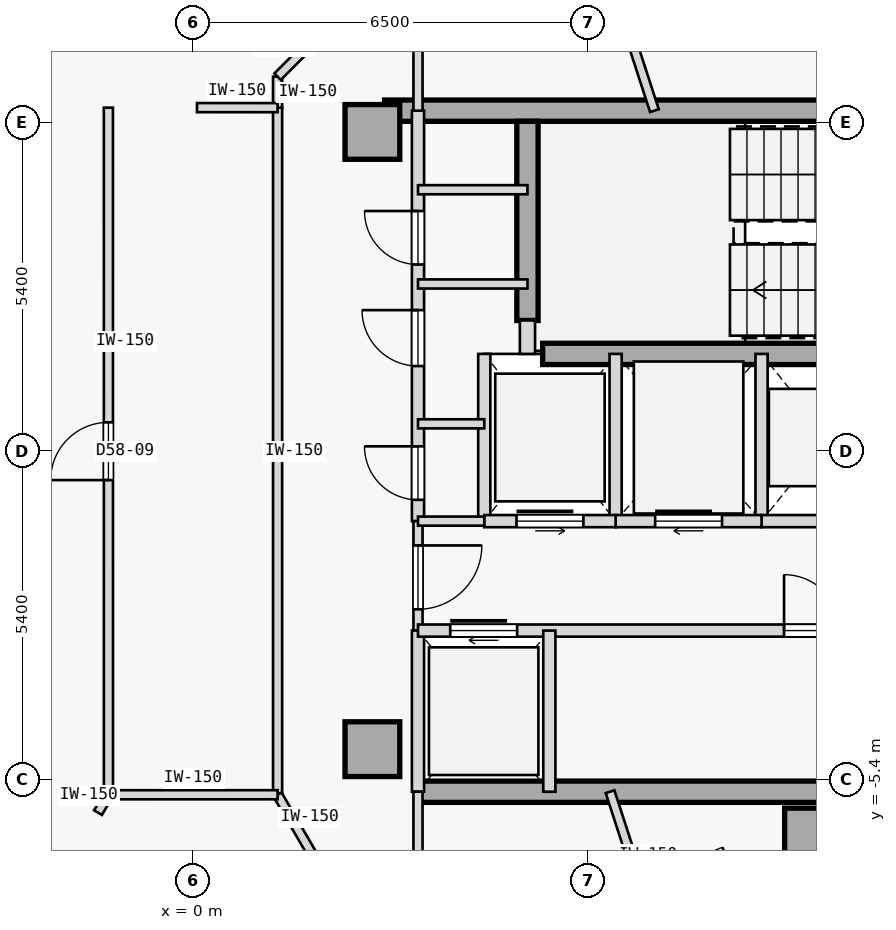
"""IFC4 building model, lengths in metres.
Left out: names, types, materials, properties, quantities, classifications, styles, units other than length and angle.
Written with IfcOpenShell. Run it as: python <this file> out.ifc"""

import sys

from ifc_helpers import new_model, si_unit, direction, frame, frame_2d, origin, origin_2d, place, context, subcontext, project, spatial, rectangle, extrude, element, fill, save


model = new_model("IFC4")
c1 = context("Model", 3, precision=1e-05, world=origin(), true_north=direction((0.0, 1.0)))
c2 = subcontext(c1, "Body", "Model", "MODEL_VIEW")
j1 = project(units=[si_unit("LENGTHUNIT", "METRE"), si_unit("PLANEANGLEUNIT", "RADIAN")], contexts=[c1])
p1 = place(None, origin())
s1 = spatial("IfcSite", under=j1, at=p1, CompositionType="ELEMENT")
p2 = place(p1, origin())
s2 = spatial("IfcBuilding", under=s1, at=p2, CompositionType="ELEMENT")
p3 = place(p2, frame((0.0, 0.0, 220.95)))
s3 = spatial("IfcBuildingStorey", under=s2, at=p3, CompositionType="ELEMENT", Elevation=220.95)
for number, where, z_axis, x_axis in (
    (1, (10.18, -6.32, 0.0), (0.0, 0.0, 1.0), (1.0, 0.0, 0.0)),
    (2, (2.95, -4.9, 0.0), (0.0, 0.0, 1.0), (1.0, 0.0, 0.0)),
    (3, (2.95, 5.25, 0.0), (0.0, 0.0, 1.0), (1.0, 0.0, 0.0)),
):
    element("IfcColumn", number, at=place(p3, frame(where, z_axis=z_axis, x_axis=x_axis)), inside=s3, PredefinedType="COLUMN", context=c2, shape_type="SweptSolid", body=[
        extrude(rectangle(XDim=0.9, YDim=0.9, at=origin_2d()), origin(), (0.0, 0.0, 1.0), 3.35),
    ])
p4 = place(p3, frame((3.15, 5.6, 0.0), z_axis=(0.0, 0.0, 1.0), x_axis=(1.0, 0.0, 0.0)))
e4 = element("IfcWall", 4, at=p4, inside=s3, PredefinedType="SHEAR", context=c2, shape_type="SweptSolid", body=[
    extrude(rectangle(XDim=11.41, YDim=0.35, at=frame_2d((5.705, 0.0))), origin(), (0.0, 0.0, 1.0), 3.125),
])
p5 = place(p3, frame((3.7, -5.6, 0.0), z_axis=(0.0, 0.0, 1.0), x_axis=(1.0, 0.0, 0.0)))
e5 = element("IfcWall", 5, at=p5, inside=s3, PredefinedType="SHEAR", context=c2, shape_type="SweptSolid", body=[
    extrude(rectangle(XDim=10.86, YDim=0.35, at=frame_2d((5.43, 0.0))), origin(), (0.0, 0.0, 1.0), 3.125),
])
p6 = place(p3, frame((5.5, 2.15, 0.0), z_axis=(0.0, 0.0, 1.0), x_axis=(0.0, 1.0, 0.0)))
e6 = element("IfcWall", 6, at=p6, inside=s3, PredefinedType="SHEAR", context=c2, shape_type="SweptSolid", body=[
    extrude(rectangle(XDim=3.275, YDim=0.35, at=frame_2d((1.638, 0.0))), origin(), (0.0, 0.0, 1.0), 3.125),
])
p7 = place(p3, frame((5.75, 1.6, 0.0), z_axis=(0.0, 0.0, 1.0), x_axis=(1.0, 0.0, 0.0)))
e7 = element("IfcWall", 7, at=p7, inside=s3, PredefinedType="SHEAR", context=c2, shape_type="SweptSolid", body=[
    extrude(rectangle(XDim=5.15, YDim=0.35, at=frame_2d((2.575, 0.0))), origin(), (0.0, 0.0, 1.0), 3.125),
])
p8 = place(p3, frame((5.5, 1.6, 0.0), z_axis=(0.0, 0.0, 1.0), x_axis=(0.0, 1.0, 0.0)))
e8 = element("IfcWall", 8, at=p8, inside=s3, PredefinedType="STANDARD", context=c2, shape_type="SweptSolid", body=[
    extrude(rectangle(XDim=0.55, YDim=0.25, at=frame_2d((0.275, 0.0))), origin(), (0.0, 0.0, 1.0), 3.125),
])
p9 = place(p3, frame((3.7, -1.15, 0.0), z_axis=(0.0, 0.0, 1.0), x_axis=(0.0, 1.0, 0.0)))
e9 = element("IfcWall", 9, at=p9, inside=s3, PredefinedType="STANDARD", context=c2, shape_type="SweptSolid", body=[
    extrude(rectangle(XDim=6.75, YDim=0.2, at=frame_2d((3.375, 0.0))), origin(), (0.0, 0.0, 1.0), 3.125),
])
p10 = place(p9, frame((0.35, 0.0, 0.0)))
e10 = element("IfcOpeningElement", 10, at=p10, cuts=e9, PredefinedType="OPENING", context=c2, shape_type="SweptSolid", body=[
    extrude(rectangle(XDim=0.88, YDim=2.15, at=frame_2d((0.44, 1.075))), frame((0.0, 0.11, 0.0), z_axis=(0.0, -1.0, 0.0), x_axis=(1.0, 0.0, 0.0)), (0.0, 0.0, 1.0), 0.22),
])
p11 = place(p9, frame((2.55, 0.0, 0.0)))
e11 = element("IfcOpeningElement", 11, at=p11, cuts=e9, PredefinedType="OPENING", context=c2, shape_type="SweptSolid", body=[
    extrude(rectangle(XDim=0.92, YDim=2.15, at=frame_2d((0.46, 1.075))), frame((0.0, 0.11, 0.0), z_axis=(0.0, -1.0, 0.0), x_axis=(1.0, 0.0, 0.0)), (0.0, 0.0, 1.0), 0.22),
])
p12 = place(p9, frame((4.22, 0.0, 0.0)))
e12 = element("IfcOpeningElement", 12, at=p12, cuts=e9, PredefinedType="OPENING", context=c2, shape_type="SweptSolid", body=[
    extrude(rectangle(XDim=0.88, YDim=2.15, at=frame_2d((0.44, 1.075))), frame((0.0, 0.11, 0.0), z_axis=(0.0, -1.0, 0.0), x_axis=(1.0, 0.0, 0.0)), (0.0, 0.0, 1.0), 0.22),
])
p13 = place(p3, frame((3.7, -2.95, 0.0), z_axis=(0.0, 0.0, 1.0), x_axis=(0.0, 1.0, 0.0)))
e13 = element("IfcWall", 13, at=p13, inside=s3, PredefinedType="PARTITIONING", context=c2, shape_type="SweptSolid", body=[
    extrude(rectangle(XDim=1.8, YDim=0.15, at=frame_2d((0.9, 0.0))), origin(), (0.0, 0.0, 1.0), 3.125),
])
p14 = place(p13, frame((0.35, 0.0, 0.0)))
e14 = element("IfcOpeningElement", 14, at=p14, cuts=e13, PredefinedType="OPENING", context=c2, shape_type="SweptSolid", body=[
    extrude(rectangle(XDim=1.05, YDim=2.18, at=frame_2d((0.525, 1.09))), frame((0.0, 0.085, 0.0), z_axis=(0.0, -1.0, 0.0), x_axis=(1.0, 0.0, 0.0)), (0.0, 0.0, 1.0), 0.17),
])
p15 = place(p3, frame((3.7, -5.6, 0.0), z_axis=(0.0, 0.0, 1.0), x_axis=(0.0, 1.0, 0.0)))
e15 = element("IfcWall", 15, at=p15, inside=s3, PredefinedType="STANDARD", context=c2, shape_type="SweptSolid", body=[
    extrude(rectangle(XDim=2.65, YDim=0.2, at=frame_2d((1.325, 0.0))), origin(), (0.0, 0.0, 1.0), 3.125),
])
p16 = place(p3, frame((9.35, -1.15, 0.0), z_axis=(0.0, 0.0, 1.0), x_axis=(0.0, 1.0, 0.0)))
e16 = element("IfcWall", 16, at=p16, inside=s3, PredefinedType="STANDARD", context=c2, shape_type="SweptSolid", body=[
    extrude(rectangle(XDim=2.75, YDim=0.2, at=frame_2d((1.375, 0.0))), origin(), (0.0, 0.0, 1.0), 3.125),
])
p17 = place(p3, frame((9.35, -1.15, 0.0), z_axis=(0.0, 0.0, 1.0), x_axis=(1.0, 0.0, 0.0)))
e17 = element("IfcWall", 17, at=p17, inside=s3, PredefinedType="STANDARD", context=c2, shape_type="SweptSolid", body=[
    extrude(rectangle(XDim=2.2, YDim=0.2, at=frame_2d((1.1, 0.0))), origin(), (0.0, 0.0, 1.0), 3.125),
])
p18 = place(p3, frame((6.95, -1.15, 0.0), z_axis=(0.0, 0.0, 1.0), x_axis=(0.0, 1.0, 0.0)))
e18 = element("IfcWall", 18, at=p18, inside=s3, PredefinedType="STANDARD", context=c2, shape_type="SweptSolid", body=[
    extrude(rectangle(XDim=2.75, YDim=0.2, at=frame_2d((1.375, 0.0))), origin(), (0.0, 0.0, 1.0), 3.125),
])
p19 = place(p3, frame((6.95, -1.15, 0.0), z_axis=(0.0, 0.0, 1.0), x_axis=(1.0, 0.0, 0.0)))
e19 = element("IfcWall", 19, at=p19, inside=s3, PredefinedType="STANDARD", context=c2, shape_type="SweptSolid", body=[
    extrude(rectangle(XDim=2.4, YDim=0.2, at=frame_2d((1.2, 0.0))), origin(), (0.0, 0.0, 1.0), 3.125),
])
p20 = place(p19, frame((0.65, 0.0, 0.0)))
e20 = element("IfcOpeningElement", 20, at=p20, cuts=e19, PredefinedType="OPENING", context=c2, shape_type="SweptSolid", body=[
    extrude(rectangle(XDim=1.1, YDim=2.15, at=frame_2d((0.55, 1.075))), frame((0.0, 0.11, 0.0), z_axis=(0.0, -1.0, 0.0), x_axis=(1.0, 0.0, 0.0)), (0.0, 0.0, 1.0), 0.22),
])
p21 = place(p3, frame((4.79, -1.15, 0.0), z_axis=(0.0, 0.0, 1.0), x_axis=(0.0, 1.0, 0.0)))
e21 = element("IfcWall", 21, at=p21, inside=s3, PredefinedType="STANDARD", context=c2, shape_type="SweptSolid", body=[
    extrude(rectangle(XDim=2.75, YDim=0.2, at=frame_2d((1.375, 0.0))), origin(), (0.0, 0.0, 1.0), 3.125),
])
p22 = place(p3, frame((4.79, -1.15, 0.0), z_axis=(0.0, 0.0, 1.0), x_axis=(1.0, 0.0, 0.0)))
e22 = element("IfcWall", 22, at=p22, inside=s3, PredefinedType="STANDARD", context=c2, shape_type="SweptSolid", body=[
    extrude(rectangle(XDim=2.16, YDim=0.2, at=frame_2d((1.08, 0.0))), origin(), (0.0, 0.0, 1.0), 3.125),
])
p23 = place(p22, frame((0.53, 0.0, 0.0)))
e23 = element("IfcOpeningElement", 23, at=p23, cuts=e22, PredefinedType="OPENING", context=c2, shape_type="SweptSolid", body=[
    extrude(rectangle(XDim=1.1, YDim=2.15, at=frame_2d((0.55, 1.075))), frame((0.0, 0.11, 0.0), z_axis=(0.0, -1.0, 0.0), x_axis=(1.0, 0.0, 0.0)), (0.0, 0.0, 1.0), 0.22),
])
p24 = place(p3, frame((3.7, -1.15, 0.0), z_axis=(0.0, 0.0, 1.0), x_axis=(1.0, 0.0, 0.0)))
e24 = element("IfcWall", 24, at=p24, inside=s3, PredefinedType="PARTITIONING", context=c2, shape_type="SweptSolid", body=[
    extrude(rectangle(XDim=1.09, YDim=0.15, at=frame_2d((0.545, 0.0))), origin(), (0.0, 0.0, 1.0), 3.125),
])
p25 = place(p3, frame((3.7, -2.95, 0.0), z_axis=(0.0, 0.0, 1.0), x_axis=(1.0, 0.0, 0.0)))
e25 = element("IfcWall", 25, at=p25, inside=s3, PredefinedType="STANDARD", context=c2, shape_type="SweptSolid", body=[
    extrude(rectangle(XDim=10.8, YDim=0.2, at=frame_2d((5.4, 0.0))), origin(), (0.0, 0.0, 1.0), 3.125),
])
p26 = place(p25, frame((0.53, 0.0, 0.0)))
e26 = element("IfcOpeningElement", 26, at=p26, cuts=e25, PredefinedType="OPENING", context=c2, shape_type="SweptSolid", body=[
    extrude(rectangle(XDim=1.1, YDim=2.15, at=frame_2d((0.55, 1.075))), frame((0.0, 0.11, 0.0), z_axis=(0.0, -1.0, 0.0), x_axis=(1.0, 0.0, 0.0)), (0.0, 0.0, 1.0), 0.22),
])
p27 = place(p25, frame((6.02, 0.0, 0.0)))
e27 = element("IfcOpeningElement", 27, at=p27, cuts=e25, PredefinedType="OPENING", context=c2, shape_type="SweptSolid", body=[
    extrude(rectangle(XDim=0.92, YDim=2.15, at=frame_2d((0.46, 1.075))), frame((0.0, 0.11, 0.0), z_axis=(0.0, -1.0, 0.0), x_axis=(1.0, 0.0, 0.0)), (0.0, 0.0, 1.0), 0.22),
])
p28 = place(p3, frame((5.86, -5.6, 0.0), z_axis=(0.0, 0.0, 1.0), x_axis=(0.0, 1.0, 0.0)))
e28 = element("IfcWall", 28, at=p28, inside=s3, PredefinedType="STANDARD", context=c2, shape_type="SweptSolid", body=[
    extrude(rectangle(XDim=2.65, YDim=0.2, at=frame_2d((1.325, 0.0))), origin(), (0.0, 0.0, 1.0), 3.125),
])
p29 = place(p3, frame((3.7, 4.3, 0.0), z_axis=(0.0, 0.0, 1.0), x_axis=(1.0, 0.0, 0.0)))
e29 = element("IfcWall", 29, at=p29, inside=s3, PredefinedType="PARTITIONING", context=c2, shape_type="SweptSolid", body=[
    extrude(rectangle(XDim=1.8, YDim=0.15, at=frame_2d((0.9, 0.0))), origin(), (0.0, 0.0, 1.0), 3.125),
])
p30 = place(p3, frame((3.7, 0.45, 0.0), z_axis=(0.0, 0.0, 1.0), x_axis=(1.0, 0.0, 0.0)))
e30 = element("IfcWall", 30, at=p30, inside=s3, PredefinedType="PARTITIONING", context=c2, shape_type="SweptSolid", body=[
    extrude(rectangle(XDim=1.09, YDim=0.15, at=frame_2d((0.545, 0.0))), origin(), (0.0, 0.0, 1.0), 3.125),
])
p31 = place(p3, frame((3.7, 2.75, 0.0), z_axis=(0.0, 0.0, 1.0), x_axis=(1.0, 0.0, 0.0)))
e31 = element("IfcWall", 31, at=p31, inside=s3, PredefinedType="PARTITIONING", context=c2, shape_type="SweptSolid", body=[
    extrude(rectangle(XDim=1.8, YDim=0.15, at=frame_2d((0.9, 0.0))), origin(), (0.0, 0.0, 1.0), 3.125),
])
p32 = place(p3, frame((-1.391, -5.65, 0.0), z_axis=(0.0, 0.0, 1.0), x_axis=(-8.6422954e-05, 0.999999996266, 0.0)))
e32 = element("IfcWall", 32, at=p32, inside=s3, PredefinedType="PARTITIONING", context=c2, shape_type="SweptSolid", body=[
    extrude(rectangle(XDim=11.3, YDim=0.15, at=frame_2d((5.65, 0.0))), origin(), (0.0, 0.0, 1.0), 3.125),
])
p33 = place(p32, frame((5.175, 0.0, 0.0)))
e33 = element("IfcOpeningElement", 33, at=p33, cuts=e32, PredefinedType="OPENING", context=c2, shape_type="SweptSolid", body=[
    extrude(rectangle(XDim=0.95, YDim=2.15, at=frame_2d((0.475, 1.075))), frame((0.0, 0.085, 0.0), z_axis=(0.0, -1.0, 0.0), x_axis=(1.0, 0.0, 0.0)), (0.0, 0.0, 1.0), 0.17),
])
p34 = place(p3, frame((1.391, -5.648, 0.0), z_axis=(0.0, 0.0, 1.0), x_axis=(-4.3218947e-05, 0.999999999066, 0.0)))
e34 = element("IfcWall", 34, at=p34, inside=s3, PredefinedType="PARTITIONING", context=c2, shape_type="SweptSolid", body=[
    extrude(rectangle(XDim=11.298, YDim=0.15, at=frame_2d((5.649, 0.0))), origin(), (0.0, 0.0, 1.0), 3.125),
])
p35 = place(p3, frame((3.7, -9.109, 0.0), z_axis=(0.0, 0.0, 1.0), x_axis=(-0.000139130433, 0.999999990321, 0.0)))
e35 = element("IfcWall", 35, at=p35, inside=s3, PredefinedType="PARTITIONING", context=c2, shape_type="SweptSolid", body=[
    extrude(rectangle(XDim=3.51, YDim=0.15, at=frame_2d((1.755, 0.0))), origin(), (0.0, 0.0, 1.0), 3.125),
])
p36 = place(p3, frame((7.588, -7.846, 0.0), z_axis=(0.0, 0.0, 1.0), x_axis=(0.951058013903, 0.309012385174, 0.0)))
e36 = element("IfcWall", 36, at=p36, inside=s3, PredefinedType="PARTITIONING", context=c2, shape_type="SweptSolid", body=[
    extrude(rectangle(XDim=7.267, YDim=0.15, at=frame_2d((3.634, 0.0))), origin(), (0.0, 0.0, 1.0), 3.125),
])
p37 = place(p36, frame((0.557, 0.0, 0.0)))
e37 = element("IfcOpeningElement", 37, at=p37, cuts=e36, PredefinedType="OPENING", context=c2, shape_type="SweptSolid", body=[
    extrude(rectangle(XDim=0.92, YDim=2.15, at=frame_2d((0.46, 1.075))), frame((0.0, 0.085, 0.0), z_axis=(0.0, -1.0, 0.0), x_axis=(1.0, 0.0, 0.0)), (0.0, 0.0, 1.0), 0.17),
])
p38 = place(p3, frame((-1.562, -5.944, 0.0), z_axis=(0.0, 0.0, 1.0), x_axis=(0.505387839696, 0.862892305845, 0.0)))
e38 = element("IfcWall", 38, at=p38, inside=s3, PredefinedType="PARTITIONING", context=c2, shape_type="SweptSolid", body=[
    extrude(rectangle(XDim=0.34, YDim=0.15, at=frame_2d((0.17, 0.0))), origin(), (0.0, 0.0, 1.0), 3.125),
])
p39 = place(p3, frame((1.391, -5.649, 0.0), z_axis=(0.0, 0.0, 1.0), x_axis=(0.502522642426, -0.864564048437, 0.0)))
e39 = element("IfcWall", 39, at=p39, inside=s3, PredefinedType="PARTITIONING", context=c2, shape_type="SweptSolid", body=[
    extrude(rectangle(XDim=1.171, YDim=0.15, at=frame_2d((0.586, 0.0))), origin(), (0.0, 0.0, 1.0), 3.125),
])
p40 = place(p3, frame((3.7, 5.6, 0.0), z_axis=(0.0, 0.0, 1.0), x_axis=(-0.000123839008, 0.999999992332, 0.0)))
e40 = element("IfcWall", 40, at=p40, inside=s3, PredefinedType="PARTITIONING", context=c2, shape_type="SweptSolid", body=[
    extrude(rectangle(XDim=5.914, YDim=0.15, at=frame_2d((2.957, 0.0))), origin(), (0.0, 0.0, 1.0), 2.675),
])
p41 = place(p40, frame((2.497, 0.0, 0.0)))
e41 = element("IfcOpeningElement", 41, at=p41, cuts=e40, PredefinedType="OPENING", context=c2, shape_type="SweptSolid", body=[
    extrude(rectangle(XDim=0.92, YDim=2.15, at=frame_2d((0.46, 1.075))), frame((0.0, 0.085, 0.0), z_axis=(0.0, -1.0, 0.0), x_axis=(1.0, 0.0, 0.0)), (0.0, 0.0, 1.0), 0.17),
])
p42 = place(p3, frame((1.391, 5.649, 0.0), z_axis=(0.0, 0.0, 1.0), x_axis=(0.000957395444, 0.999999541697, 0.0)))
e42 = element("IfcWall", 42, at=p42, inside=s3, PredefinedType="PARTITIONING", context=c2, shape_type="SweptSolid", body=[
    extrude(rectangle(XDim=0.51, YDim=0.15, at=frame_2d((0.255, 0.0))), origin(), (0.0, 0.0, 1.0), 3.125),
])
p43 = place(p3, frame((1.391, 6.159, 0.0), z_axis=(0.0, 0.0, 1.0), x_axis=(0.707106781187, 0.707106781187, 0.0)))
e43 = element("IfcWall", 43, at=p43, inside=s3, PredefinedType="PARTITIONING", context=c2, shape_type="SweptSolid", body=[
    extrude(rectangle(XDim=0.833, YDim=0.15, at=frame_2d((0.417, 0.0))), origin(), (0.0, 0.0, 1.0), 3.125),
])
p44 = place(p3, frame((-1.391, -5.65, 0.0), z_axis=(0.0, 0.0, 1.0), x_axis=(0.999999965344, 0.000263273356, 0.0)))
e44 = element("IfcWall", 44, at=p44, inside=s3, PredefinedType="PARTITIONING", context=c2, shape_type="SweptSolid", body=[
    extrude(rectangle(XDim=2.782, YDim=0.15, at=frame_2d((1.391, 0.0))), origin(), (0.0, 0.0, 1.0), 3.125),
])
p45 = place(p3, frame((0.066, 5.65, 0.0), z_axis=(0.0, 0.0, 1.0), x_axis=(0.999999932094, -0.000368527707, 0.0)))
e45 = element("IfcWall", 45, at=p45, inside=s3, PredefinedType="PARTITIONING", context=c2, shape_type="SweptSolid", body=[
    extrude(rectangle(XDim=1.325, YDim=0.15, at=frame_2d((0.663, 0.0))), origin(), (0.0, 0.0, 1.0), 3.125),
])
p46 = place(p3, frame((7.588, -7.846, 0.0), z_axis=(0.0, 0.0, 1.0), x_axis=(-0.309055688452, 0.951043942957, 0.0)))
e46 = element("IfcWall", 46, at=p46, inside=s3, PredefinedType="PARTITIONING", context=c2, shape_type="SweptSolid", body=[
    extrude(rectangle(XDim=2.362, YDim=0.15, at=frame_2d((1.181, 0.0))), origin(), (0.0, 0.0, 1.0), 3.125),
])
p47 = place(p3, frame((7.588, 5.6, 0.0), z_axis=(0.0, 0.0, 1.0), x_axis=(-0.309018946982, 0.951055881852, 0.0)))
e47 = element("IfcWall", 47, at=p47, inside=s3, PredefinedType="PARTITIONING", context=c2, shape_type="SweptSolid", body=[
    extrude(rectangle(XDim=6.826, YDim=0.15, at=frame_2d((3.413, 0.0))), origin(), (0.0, 0.0, 1.0), 3.125),
])
p48 = place(p14, frame((1.05, 0.0, 0.0), z_axis=(0.0, 0.0, 1.0), x_axis=(-1.0, 0.0, 0.0)))
e48 = element("IfcDoor", 48, at=p48, inside=s3, OperationType="SINGLE_SWING_RIGHT", PredefinedType="DOOR", context=c2, shape_type="SweptSolid", body=[
    extrude(rectangle(XDim=1.05, YDim=2.18, at=frame_2d((0.525, 1.09))), frame((0.0, 0.025, 0.0), z_axis=(0.0, -1.0, 0.0), x_axis=(1.0, 0.0, 0.0)), (0.0, 0.0, 1.0), 0.05),
])
fill(e14, e48)
p49 = place(p20, origin())
e49 = element("IfcDoor", 49, at=p49, inside=s3, OperationType="SLIDING_TO_RIGHT", PredefinedType="DOOR", context=c2, shape_type="SweptSolid", body=[
    extrude(rectangle(XDim=1.1, YDim=2.15, at=frame_2d((0.55, 1.075))), frame((0.0, 0.025, 0.0), z_axis=(0.0, -1.0, 0.0), x_axis=(1.0, 0.0, 0.0)), (0.0, 0.0, 1.0), 0.05),
])
fill(e20, e49)
p50 = place(p23, origin())
e50 = element("IfcDoor", 50, at=p50, inside=s3, OperationType="SLIDING_TO_LEFT", PredefinedType="DOOR", context=c2, shape_type="SweptSolid", body=[
    extrude(rectangle(XDim=1.1, YDim=2.15, at=frame_2d((0.55, 1.075))), frame((0.0, 0.025, 0.0), z_axis=(0.0, -1.0, 0.0), x_axis=(1.0, 0.0, 0.0)), (0.0, 0.0, 1.0), 0.05),
])
fill(e23, e50)
p51 = place(p26, origin())
e51 = element("IfcDoor", 51, at=p51, inside=s3, OperationType="SLIDING_TO_RIGHT", PredefinedType="DOOR", context=c2, shape_type="SweptSolid", body=[
    extrude(rectangle(XDim=1.1, YDim=2.15, at=frame_2d((0.55, 1.075))), frame((0.0, 0.025, 0.0), z_axis=(0.0, -1.0, 0.0), x_axis=(1.0, 0.0, 0.0)), (0.0, 0.0, 1.0), 0.05),
])
fill(e26, e51)
p52 = place(p27, origin())
e52 = element("IfcDoor", 52, at=p52, inside=s3, OperationType="SINGLE_SWING_LEFT", PredefinedType="DOOR", context=c2, shape_type="SweptSolid", body=[
    extrude(rectangle(XDim=0.92, YDim=2.15, at=frame_2d((0.46, 1.075))), frame((0.0, 0.025, 0.0), z_axis=(0.0, -1.0, 0.0), x_axis=(1.0, 0.0, 0.0)), (0.0, 0.0, 1.0), 0.05),
])
fill(e27, e52)
p53 = place(p10, origin())
e53 = element("IfcDoor", 53, at=p53, inside=s3, OperationType="SINGLE_SWING_RIGHT", PredefinedType="DOOR", context=c2, shape_type="SweptSolid", body=[
    extrude(rectangle(XDim=0.88, YDim=2.15, at=frame_2d((0.44, 1.075))), frame((0.0, 0.025, 0.0), z_axis=(0.0, -1.0, 0.0), x_axis=(1.0, 0.0, 0.0)), (0.0, 0.0, 1.0), 0.05),
])
fill(e10, e53)
p54 = place(p11, origin())
e54 = element("IfcDoor", 54, at=p54, inside=s3, OperationType="SINGLE_SWING_RIGHT", PredefinedType="DOOR", context=c2, shape_type="SweptSolid", body=[
    extrude(rectangle(XDim=0.92, YDim=2.15, at=frame_2d((0.46, 1.075))), frame((0.0, 0.025, 0.0), z_axis=(0.0, -1.0, 0.0), x_axis=(1.0, 0.0, 0.0)), (0.0, 0.0, 1.0), 0.05),
])
fill(e11, e54)
p55 = place(p12, origin())
e55 = element("IfcDoor", 55, at=p55, inside=s3, OperationType="SINGLE_SWING_RIGHT", PredefinedType="DOOR", context=c2, shape_type="SweptSolid", body=[
    extrude(rectangle(XDim=0.88, YDim=2.15, at=frame_2d((0.44, 1.075))), frame((0.0, 0.025, 0.0), z_axis=(0.0, -1.0, 0.0), x_axis=(1.0, 0.0, 0.0)), (0.0, 0.0, 1.0), 0.05),
])
fill(e12, e55)
p56 = place(p33, origin())
e56 = element("IfcDoor", 56, at=p56, inside=s3, OperationType="SINGLE_SWING_LEFT", PredefinedType="DOOR", context=c2, shape_type="SweptSolid", body=[
    extrude(rectangle(XDim=0.95, YDim=2.15, at=frame_2d((0.475, 1.075))), frame((0.0, 0.025, 0.0), z_axis=(0.0, -1.0, 0.0), x_axis=(1.0, 0.0, 0.0)), (0.0, 0.0, 1.0), 0.05),
])
fill(e33, e56)
save(model, sys.argv[1])
